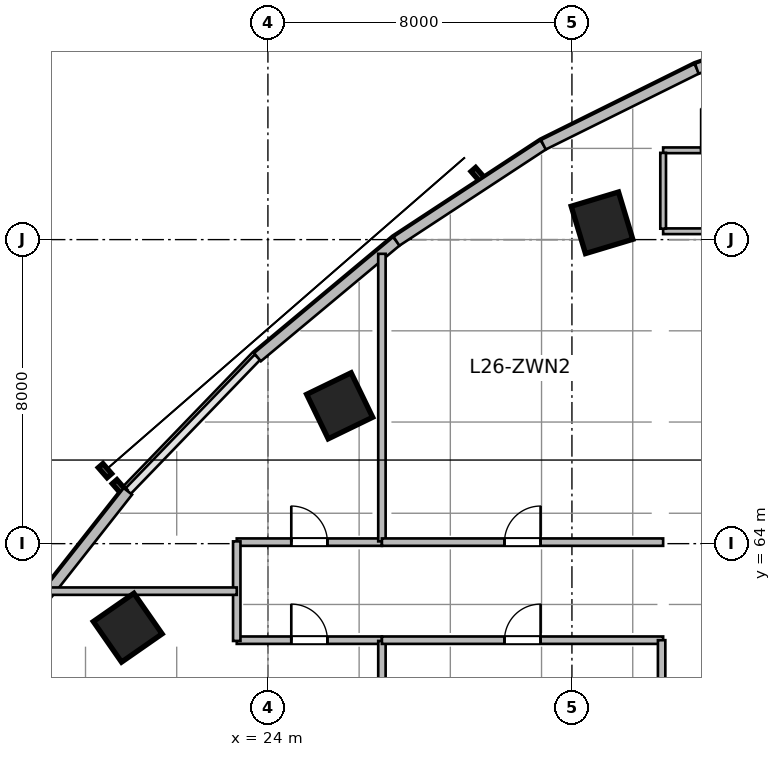
"""IFC4 building model, lengths in metres.
Left out: names, types, materials, properties, quantities, classifications, styles, units other than length and angle.
Written with IfcOpenShell. Run it as: python <this file> out.ifc"""

import sys

from ifc_helpers import new_model, si_unit, direction, frame, frame_2d, origin, origin_2d, place, context, subcontext, project, spatial, rectangle, extrude, source, transform, mapped, element, fill, save


model = new_model("IFC4")
c1 = context("Model", 3, precision=1e-05, world=origin(), true_north=direction((0.0, 1.0)))
c2 = subcontext(c1, "Body", "Model", "MODEL_VIEW")
j1 = project(units=[si_unit("LENGTHUNIT", "METRE"), si_unit("PLANEANGLEUNIT", "RADIAN")], contexts=[c1])
p1 = place(None, origin())
s1 = spatial("IfcSite", under=j1, at=p1, CompositionType="ELEMENT")
p2 = place(p1, origin())
s2 = spatial("IfcBuilding", under=s1, at=p2, CompositionType="ELEMENT")
p3 = place(p2, frame((0.0, 0.0, 111.6)))
s3 = spatial("IfcBuildingStorey", under=s2, at=p3, CompositionType="ELEMENT", Elevation=111.6)
m1 = source(origin(), c2, "Body", "SweptSolid", [
    extrude(rectangle(XDim=1.3, YDim=1.3, at=origin_2d()), origin(), (0.0, 0.0, 1.0), 3.9),
])
for number, where, z_axis, x_axis in (
    (1, (20.311, 61.789, 0.0), (0.0, 0.0, 1.0), (-0.571, 0.821, 0.0)),
    (2, (25.888, 67.627, 0.0), (0.0, 0.0, 1.0), (-0.436, 0.9, 0.0)),
    (3, (32.791, 72.442, 0.0), (0.0, 0.0, 1.0), (-0.289, 0.957, 0.0)),
):
    element("IfcColumn", number, at=place(p3, frame(where, z_axis=z_axis, x_axis=x_axis)), inside=s3, PredefinedType="COLUMN", context=c2, shape_type="MappedRepresentation", body=[
        mapped(m1, transform((0.0, 0.0, 0.0), scale=1.0)),
    ])
m2 = source(origin(), c2, "Body", "SweptSolid", [
    extrude(rectangle(XDim=5.058, YDim=0.28, at=frame_2d((2.529, 0.0))), origin(), (0.0, 0.0, 1.0), 3.65),
])
p4 = place(p3, frame((17.188, 61.4, 0.0), z_axis=(0.0, 0.0, 1.0), x_axis=(0.618145507434, 0.786063694391, 0.0)))
e4 = element("IfcWall", 4, at=p4, inside=s3, PredefinedType="SOLIDWALL", context=c2, shape_type="MappedRepresentation", body=[
    mapped(m2, transform((0.0, 0.0, 0.0), scale=1.0)),
])
m3 = source(origin(), c2, "Body", "SweptSolid", [
    extrude(rectangle(XDim=4.762, YDim=0.28, at=frame_2d((2.381, 0.0))), origin(), (0.0, 0.0, 1.0), 3.65),
])
p5 = place(p3, frame((23.725, 68.907, 0.0), z_axis=(0.0, 0.0, 1.0), x_axis=(0.767952279762, 0.640507061638, 0.0)))
e5 = element("IfcWall", 5, at=p5, inside=s3, PredefinedType="SOLIDWALL", context=c2, shape_type="MappedRepresentation", body=[
    mapped(m3, transform((0.0, 0.0, 0.0), scale=1.0)),
])
m4 = source(origin(), c2, "Body", "SweptSolid", [
    extrude(rectangle(XDim=4.626, YDim=0.28, at=frame_2d((2.313, 0.0))), origin(), (0.0, 0.0, 1.0), 3.65),
])
p6 = place(p3, frame((27.382, 71.958, 0.0), z_axis=(0.0, 0.0, 1.0), x_axis=(0.83595938331, 0.548791316855, 0.0)))
e6 = element("IfcWall", 6, at=p6, inside=s3, PredefinedType="SOLIDWALL", context=c2, shape_type="MappedRepresentation", body=[
    mapped(m4, transform((0.0, 0.0, 0.0), scale=1.0)),
])
m5 = source(origin(), c2, "Body", "SweptSolid", [
    extrude(rectangle(XDim=4.506, YDim=0.28, at=frame_2d((2.253, 0.0))), origin(), (0.0, 0.0, 1.0), 3.65),
])
p7 = place(p3, frame((31.249, 74.496, 0.0), z_axis=(0.0, 0.0, 1.0), x_axis=(0.89597155075, 0.444111450254, 0.0)))
e7 = element("IfcWall", 7, at=p7, inside=s3, PredefinedType="SOLIDWALL", context=c2, shape_type="MappedRepresentation", body=[
    mapped(m5, transform((0.0, 0.0, 0.0), scale=1.0)),
])
m6 = source(origin(), c2, "Body", "SweptSolid", [
    extrude(rectangle(XDim=4.409, YDim=0.28, at=frame_2d((2.205, 0.0))), origin(), (0.0, 0.0, 1.0), 3.65),
])
p8 = place(p3, frame((35.286, 76.497, 0.0), z_axis=(0.0, 0.0, 1.0), x_axis=(0.944879374121, 0.327418643881, 0.0)))
e8 = element("IfcWall", 8, at=p8, inside=s3, PredefinedType="SOLIDWALL", context=c2, shape_type="MappedRepresentation", body=[
    mapped(m6, transform((0.0, 0.0, 0.0), scale=1.0)),
])
m7 = source(origin(), c2, "Body", "SweptSolid", [
    extrude(rectangle(XDim=2.1, YDim=0.15, at=frame_2d((1.05, 0.0))), origin(), (0.0, 0.0, 1.0), 3.65),
])
p9 = place(p3, frame((34.4, 72.22, 0.0), z_axis=(0.0, 0.0, 1.0), x_axis=(1.0, 0.0, 0.0)))
e9 = element("IfcWall", 9, at=p9, inside=s3, PredefinedType="PARTITIONING", context=c2, shape_type="MappedRepresentation", body=[
    mapped(m7, transform((0.0, 0.0, 0.0), scale=1.0)),
])
m8 = source(origin(), c2, "Body", "SweptSolid", [
    extrude(rectangle(XDim=3.1, YDim=0.15, at=frame_2d((1.55, 0.0))), origin(), (0.0, 0.0, 1.0), 3.022),
])
p10 = place(p3, frame((34.4, 74.35, 0.0), z_axis=(0.0, 0.0, 1.0), x_axis=(1.0, 0.0, 0.0)))
e10 = element("IfcWall", 10, at=p10, inside=s3, PredefinedType="PARTITIONING", context=c2, shape_type="MappedRepresentation", body=[
    mapped(m8, transform((0.0, 0.0, 0.0), scale=1.0)),
])
p11 = place(p10, frame((1.0, 0.0, 0.0)))
e11 = element("IfcOpeningElement", 11, at=p11, cuts=e10, PredefinedType="OPENING", context=c2, shape_type="SweptSolid", body=[
    extrude(rectangle(XDim=1.1, YDim=2.15, at=frame_2d((0.55, 1.075))), frame((0.0, 0.085, 0.0), z_axis=(0.0, -1.0, 0.0), x_axis=(1.0, 0.0, 0.0)), (0.0, 0.0, 1.0), 0.17),
])
m9 = source(origin(), c2, "Body", "SweptSolid", [
    extrude(rectangle(XDim=1.995, YDim=0.15, at=frame_2d((0.998, 0.0))), origin(), (0.0, 0.0, 1.0), 3.65),
])
p12 = place(p3, frame((34.4, 72.288, 0.0), z_axis=(0.0, 0.0, 1.0), x_axis=(0.0, 1.0, 0.0)))
e12 = element("IfcWall", 12, at=p12, inside=s3, PredefinedType="PARTITIONING", context=c2, shape_type="MappedRepresentation", body=[
    mapped(m9, transform((0.0, 0.0, 0.0), scale=1.0)),
])
m10 = source(origin(), c2, "Body", "SweptSolid", [
    extrude(rectangle(XDim=3.82, YDim=0.195, at=frame_2d((1.91, 0.0))), origin(), (0.0, 0.0, 1.0), 3.65),
])
p13 = place(p3, frame((23.18, 64.04, 0.0), z_axis=(0.0, 0.0, 1.0), x_axis=(1.0, 0.0, 0.0)))
e13 = element("IfcWall", 13, at=p13, inside=s3, PredefinedType="PARTITIONING", context=c2, shape_type="MappedRepresentation", body=[
    mapped(m10, transform((0.0, 0.0, 0.0), scale=1.0)),
])
p14 = place(p13, frame((1.435, 0.0, 0.0)))
e14 = element("IfcOpeningElement", 14, at=p14, cuts=e13, PredefinedType="OPENING", context=c2, shape_type="SweptSolid", body=[
    extrude(rectangle(XDim=0.95, YDim=2.1, at=frame_2d((0.475, 1.05))), frame((0.0, 0.107, 0.0), z_axis=(0.0, -1.0, 0.0), x_axis=(1.0, 0.0, 0.0)), (0.0, 0.0, 1.0), 0.215),
])
m11 = source(origin(), c2, "Body", "SweptSolid", [
    extrude(rectangle(XDim=7.566, YDim=0.195, at=frame_2d((3.783, 0.0))), origin(), (0.0, 0.0, 1.0), 2.942),
])
p15 = place(p3, frame((27.0, 64.06, 0.0), z_axis=(0.0, 0.0, 1.0), x_axis=(0.0, 1.0, 0.0)))
e15 = element("IfcWall", 15, at=p15, inside=s3, PredefinedType="PARTITIONING", context=c2, shape_type="MappedRepresentation", body=[
    mapped(m11, transform((0.0, 0.0, 0.0), scale=1.0)),
])
m12 = source(origin(), c2, "Body", "SweptSolid", [
    extrude(rectangle(XDim=7.4, YDim=0.195, at=frame_2d((3.7, 0.0))), origin(), (0.0, 0.0, 1.0), 3.65),
])
p16 = place(p3, frame((27.0, 64.04, 0.0), z_axis=(0.0, 0.0, 1.0), x_axis=(1.0, 0.0, 0.0)))
e16 = element("IfcWall", 16, at=p16, inside=s3, PredefinedType="PARTITIONING", context=c2, shape_type="MappedRepresentation", body=[
    mapped(m12, transform((0.0, 0.0, 0.0), scale=1.0)),
])
p17 = place(p16, frame((3.225, 0.0, 0.0)))
e17 = element("IfcOpeningElement", 17, at=p17, cuts=e16, PredefinedType="OPENING", context=c2, shape_type="SweptSolid", body=[
    extrude(rectangle(XDim=0.95, YDim=2.1, at=frame_2d((0.475, 1.05))), frame((0.0, 0.107, 0.0), z_axis=(0.0, -1.0, 0.0), x_axis=(1.0, 0.0, 0.0)), (0.0, 0.0, 1.0), 0.215),
])
p18 = place(p3, frame((23.18, 61.46, 0.0), z_axis=(0.0, 0.0, 1.0), x_axis=(1.0, 0.0, 0.0)))
e18 = element("IfcWall", 18, at=p18, inside=s3, PredefinedType="PARTITIONING", context=c2, shape_type="MappedRepresentation", body=[
    mapped(m10, transform((0.0, 0.0, 0.0), scale=1.0)),
])
p19 = place(p18, frame((1.435, 0.0, 0.0)))
e19 = element("IfcOpeningElement", 19, at=p19, cuts=e18, PredefinedType="OPENING", context=c2, shape_type="SweptSolid", body=[
    extrude(rectangle(XDim=0.95, YDim=2.1, at=frame_2d((0.475, 1.05))), frame((0.0, 0.107, 0.0), z_axis=(0.0, -1.0, 0.0), x_axis=(1.0, 0.0, 0.0)), (0.0, 0.0, 1.0), 0.215),
])
m13 = source(origin(), c2, "Body", "SweptSolid", [
    extrude(rectangle(XDim=23.771, YDim=0.195, at=frame_2d((11.886, 0.0))), origin(), (0.0, 0.0, 1.0), 2.942),
])
p20 = place(p3, frame((27.0, 37.668, 0.0), z_axis=(0.0, 0.0, 1.0), x_axis=(0.0, 1.0, 0.0)))
e20 = element("IfcWall", 20, at=p20, inside=s3, PredefinedType="PARTITIONING", context=c2, shape_type="MappedRepresentation", body=[
    mapped(m13, transform((0.0, 0.0, 0.0), scale=1.0)),
])
p21 = place(p3, frame((27.0, 61.46, 0.0), z_axis=(0.0, 0.0, 1.0), x_axis=(1.0, 0.0, 0.0)))
e21 = element("IfcWall", 21, at=p21, inside=s3, PredefinedType="PARTITIONING", context=c2, shape_type="MappedRepresentation", body=[
    mapped(m12, transform((0.0, 0.0, 0.0), scale=1.0)),
])
p22 = place(p21, frame((3.225, 0.0, 0.0)))
e22 = element("IfcOpeningElement", 22, at=p22, cuts=e21, PredefinedType="OPENING", context=c2, shape_type="SweptSolid", body=[
    extrude(rectangle(XDim=0.95, YDim=2.1, at=frame_2d((0.475, 1.05))), frame((0.0, 0.107, 0.0), z_axis=(0.0, -1.0, 0.0), x_axis=(1.0, 0.0, 0.0)), (0.0, 0.0, 1.0), 0.215),
])
m14 = source(origin(), c2, "Body", "SweptSolid", [
    extrude(rectangle(XDim=13.988, YDim=0.195, at=frame_2d((6.994, 0.0))), origin(), (0.0, 0.0, 1.0), 3.65),
])
p23 = place(p3, frame((34.36, 47.472, 0.0), z_axis=(0.0, 0.0, 1.0), x_axis=(0.0, 1.0, 0.0)))
e23 = element("IfcWall", 23, at=p23, inside=s3, PredefinedType="PARTITIONING", context=c2, shape_type="MappedRepresentation", body=[
    mapped(m14, transform((0.0, 0.0, 0.0), scale=1.0)),
])
m15 = source(origin(), c2, "Body", "SweptSolid", [
    extrude(rectangle(XDim=2.62, YDim=0.195, at=frame_2d((1.31, 0.0))), origin(), (0.0, 0.0, 1.0), 3.65),
])
p24 = place(p3, frame((23.18, 61.44, 0.0), z_axis=(0.0, 0.0, 1.0), x_axis=(0.0, 1.0, 0.0)))
e24 = element("IfcWall", 24, at=p24, inside=s3, PredefinedType="PARTITIONING", context=c2, shape_type="MappedRepresentation", body=[
    mapped(m15, transform((0.0, 0.0, 0.0), scale=1.0)),
])
m16 = source(origin(), c2, "Body", "SweptSolid", [
    extrude(rectangle(XDim=4.917, YDim=0.195, at=frame_2d((2.459, 0.0))), origin(), (0.0, 0.0, 1.0), 3.65),
])
p25 = place(p3, frame((18.262, 62.75, 0.0), z_axis=(0.0, 0.0, 1.0), x_axis=(1.0, 0.0, 0.0)))
e25 = element("IfcWall", 25, at=p25, inside=s3, PredefinedType="PARTITIONING", context=c2, shape_type="MappedRepresentation", body=[
    mapped(m16, transform((0.0, 0.0, 0.0), scale=1.0)),
])
m17 = source(origin(), c2, "Body", "SweptSolid", [
    extrude(rectangle(XDim=0.95, YDim=2.1, at=frame_2d((0.475, 1.05))), frame((0.0, 0.025, 0.0), z_axis=(0.0, -1.0, 0.0), x_axis=(1.0, 0.0, 0.0)), (0.0, 0.0, 1.0), 0.05),
])
p26 = place(p14, origin())
e26 = element("IfcDoor", 26, at=p26, inside=s3, OperationType="SINGLE_SWING_LEFT", PredefinedType="DOOR", context=c2, shape_type="MappedRepresentation", body=[
    mapped(m17, transform((0.0, 0.0, 0.0), scale=1.0)),
])
fill(e14, e26)
p27 = place(p17, origin())
e27 = element("IfcDoor", 27, at=p27, inside=s3, OperationType="SINGLE_SWING_RIGHT", PredefinedType="DOOR", context=c2, shape_type="MappedRepresentation", body=[
    mapped(m17, transform((0.0, 0.0, 0.0), scale=1.0)),
])
fill(e17, e27)
p28 = place(p19, origin())
e28 = element("IfcDoor", 28, at=p28, inside=s3, OperationType="SINGLE_SWING_LEFT", PredefinedType="DOOR", context=c2, shape_type="MappedRepresentation", body=[
    mapped(m17, transform((0.0, 0.0, 0.0), scale=1.0)),
])
fill(e19, e28)
p29 = place(p22, origin())
e29 = element("IfcDoor", 29, at=p29, inside=s3, OperationType="SINGLE_SWING_RIGHT", PredefinedType="DOOR", context=c2, shape_type="MappedRepresentation", body=[
    mapped(m17, transform((0.0, 0.0, 0.0), scale=1.0)),
])
fill(e22, e29)
save(model, sys.argv[1])
